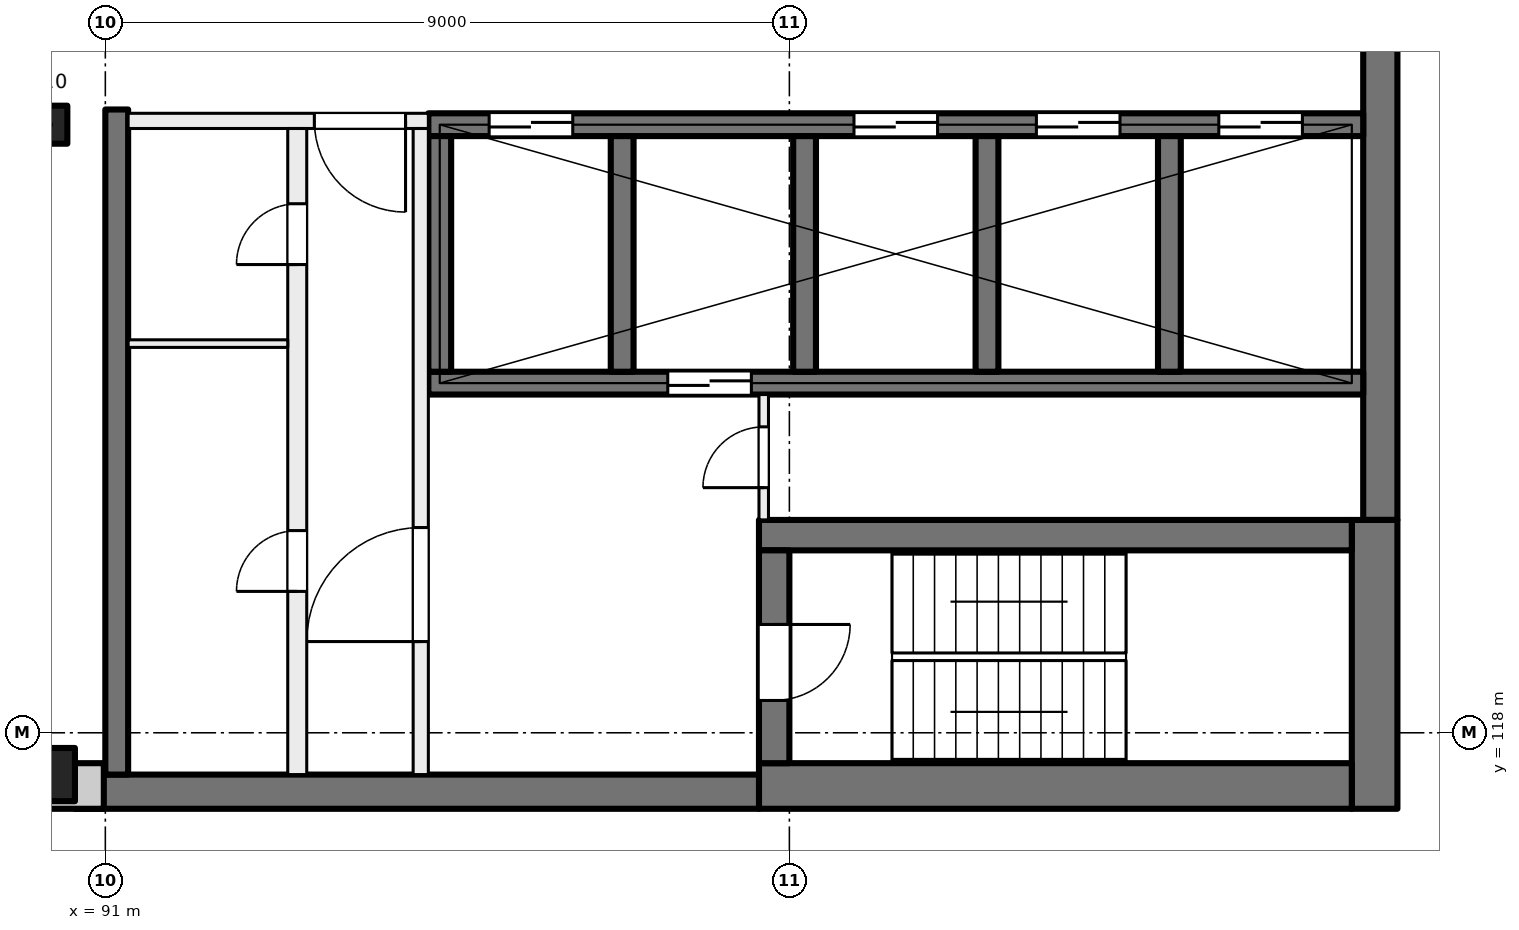
"""IFC4 building model, lengths in metres.
Left out: names, types, materials, properties, quantities, classifications, styles, units other than length and angle.
Written with IfcOpenShell. Run it as: python <this file> out.ifc"""

import sys

from ifc_helpers import new_model, si_unit, direction, frame, frame_2d, origin, origin_2d, place, context, subcontext, project, spatial, rectangle, extrude, element, fill, save


model = new_model("IFC4")
c1 = context("Model", 3, precision=1e-05, world=origin(), true_north=direction((0.0, 1.0)))
c2 = subcontext(c1, "Body", "Model", "MODEL_VIEW")
j1 = project(units=[si_unit("LENGTHUNIT", "METRE"), si_unit("PLANEANGLEUNIT", "RADIAN")], contexts=[c1])
p1 = place(None, origin())
s1 = spatial("IfcSite", under=j1, at=p1, CompositionType="ELEMENT")
p2 = place(p1, origin())
s2 = spatial("IfcBuilding", under=s1, at=p2, CompositionType="ELEMENT")
p3 = place(p2, frame((0.0, 0.0, 245.5)))
s3 = spatial("IfcBuildingStorey", under=s2, at=p3, CompositionType="ELEMENT", Elevation=245.5)
p4 = place(p3, frame((90.25, 126.0, 0.0), z_axis=(0.0, 0.0, 1.0), x_axis=(1.0, 0.0, 0.0)))
e1 = element("IfcColumn", 1, at=p4, inside=s3, PredefinedType="COLUMN", context=c2, shape_type="SweptSolid", body=[
    extrude(rectangle(XDim=0.5, YDim=0.5, at=origin_2d()), origin(), (0.0, 0.0, 1.0), 4.0),
])
p5 = place(p3, frame((90.25, 117.45, 0.0), z_axis=(0.0, 0.0, 1.0), x_axis=(1.0, 0.0, 0.0)))
e2 = element("IfcColumn", 2, at=p5, inside=s3, PredefinedType="COLUMN", context=c2, shape_type="SweptSolid", body=[
    extrude(rectangle(XDim=0.7, YDim=0.7, at=origin_2d()), origin(), (0.0, 0.0, 1.0), 4.0),
])
p6 = place(p3, frame((107.775, 135.2, 0.0), z_axis=(0.0, 0.0, 1.0), x_axis=(0.0, -1.0, 0.0)))
e3 = element("IfcWall", 3, at=p6, inside=s3, PredefinedType="SHEAR", context=c2, shape_type="SweptSolid", body=[
    extrude(rectangle(XDim=14.4, YDim=0.45, at=frame_2d((7.2, 0.0))), origin(), (0.0, 0.0, 1.0), 4.0),
])
p7 = place(p3, frame((107.7, 120.8, 0.0), z_axis=(0.0, 0.0, 1.0), x_axis=(0.0, -1.0, 0.0)))
e4 = element("IfcWall", 4, at=p7, inside=s3, PredefinedType="SHEAR", context=c2, shape_type="SweptSolid", body=[
    extrude(rectangle(XDim=3.8, YDim=0.6, at=frame_2d((1.9, 0.0))), origin(), (0.0, 0.0, 1.0), 4.0),
])
p8 = place(p3, frame((107.4, 117.3, 0.0), z_axis=(0.0, 0.0, 1.0), x_axis=(-1.0, 0.0, 0.0)))
e5 = element("IfcWall", 5, at=p8, inside=s3, PredefinedType="SHEAR", context=c2, shape_type="SweptSolid", body=[
    extrude(rectangle(XDim=7.8, YDim=0.6, at=frame_2d((3.9, 0.0))), origin(), (0.0, 0.0, 1.0), 4.0),
])
p9 = place(p3, frame((99.6, 117.225, 0.0), z_axis=(0.0, 0.0, 1.0), x_axis=(-1.0, 0.0, 0.0)))
e6 = element("IfcWall", 6, at=p9, inside=s3, PredefinedType="SHEAR", context=c2, shape_type="SweptSolid", body=[
    extrude(rectangle(XDim=9.0, YDim=0.45, at=frame_2d((4.5, 0.0))), origin(), (0.0, 0.0, 1.0), 4.0),
])
p10 = place(p3, frame((107.4, 120.6, 0.0), z_axis=(0.0, 0.0, 1.0), x_axis=(-1.0, 0.0, 0.0)))
e7 = element("IfcWall", 7, at=p10, inside=s3, PredefinedType="SHEAR", context=c2, shape_type="SweptSolid", body=[
    extrude(rectangle(XDim=7.8, YDim=0.4, at=frame_2d((3.9, 0.0))), origin(), (0.0, 0.0, 1.0), 4.0),
])
p11 = place(p3, frame((99.8, 120.4, 0.0), z_axis=(0.0, 0.0, 1.0), x_axis=(0.0, -1.0, 0.0)))
e8 = element("IfcWall", 8, at=p11, inside=s3, PredefinedType="SHEAR", context=c2, shape_type="SweptSolid", body=[
    extrude(rectangle(XDim=2.8, YDim=0.4, at=frame_2d((1.4, 0.0))), origin(), (0.0, 0.0, 1.0), 4.0),
])
p12 = place(p11, frame((0.975, 0.0, 0.0)))
e9 = element("IfcOpeningElement", 9, at=p12, cuts=e8, PredefinedType="OPENING", context=c2, shape_type="SweptSolid", body=[
    extrude(rectangle(XDim=1.0, YDim=2.1, at=frame_2d((0.5, 1.05))), frame((0.0, 0.21, 0.0), z_axis=(0.0, -1.0, 0.0), x_axis=(1.0, 0.0, 0.0)), (0.0, 0.0, 1.0), 0.42),
])
p13 = place(p3, frame((107.55, 126.0, 0.0), z_axis=(0.0, 0.0, 1.0), x_axis=(-1.0, 0.0, 0.0)))
e10 = element("IfcWall", 10, at=p13, inside=s3, PredefinedType="SHEAR", context=c2, shape_type="SweptSolid", body=[
    extrude(rectangle(XDim=12.3, YDim=0.3, at=frame_2d((6.15, 0.0))), origin(), (0.0, 0.0, 1.0), 4.0),
])
p14 = place(p13, frame((0.8, 0.0, 0.0)))
e11 = element("IfcOpeningElement", 11, at=p14, cuts=e10, PredefinedType="OPENING", context=c2, shape_type="SweptSolid", body=[
    extrude(rectangle(XDim=1.1, YDim=2.1, at=frame_2d((0.55, 1.05))), frame((0.0, 0.16, 0.0), z_axis=(0.0, -1.0, 0.0), x_axis=(1.0, 0.0, 0.0)), (0.0, 0.0, 1.0), 0.32),
])
p15 = place(p13, frame((3.2, 0.0, 0.0)))
e12 = element("IfcOpeningElement", 12, at=p15, cuts=e10, PredefinedType="OPENING", context=c2, shape_type="SweptSolid", body=[
    extrude(rectangle(XDim=1.1, YDim=2.1, at=frame_2d((0.55, 1.05))), frame((0.0, 0.16, 0.0), z_axis=(0.0, -1.0, 0.0), x_axis=(1.0, 0.0, 0.0)), (0.0, 0.0, 1.0), 0.32),
])
p16 = place(p13, frame((5.6, 0.0, 0.0)))
e13 = element("IfcOpeningElement", 13, at=p16, cuts=e10, PredefinedType="OPENING", context=c2, shape_type="SweptSolid", body=[
    extrude(rectangle(XDim=1.1, YDim=2.1, at=frame_2d((0.55, 1.05))), frame((0.0, 0.16, 0.0), z_axis=(0.0, -1.0, 0.0), x_axis=(1.0, 0.0, 0.0)), (0.0, 0.0, 1.0), 0.32),
])
p17 = place(p13, frame((10.4, 0.0, 0.0)))
e14 = element("IfcOpeningElement", 14, at=p17, cuts=e10, PredefinedType="OPENING", context=c2, shape_type="SweptSolid", body=[
    extrude(rectangle(XDim=1.1, YDim=2.1, at=frame_2d((0.55, 1.05))), frame((0.0, 0.16, 0.0), z_axis=(0.0, -1.0, 0.0), x_axis=(1.0, 0.0, 0.0)), (0.0, 0.0, 1.0), 0.32),
])
p18 = place(p3, frame((107.55, 122.6, 0.0), z_axis=(0.0, 0.0, 1.0), x_axis=(-1.0, 0.0, 0.0)))
e15 = element("IfcWall", 15, at=p18, inside=s3, PredefinedType="SHEAR", context=c2, shape_type="SweptSolid", body=[
    extrude(rectangle(XDim=12.3, YDim=0.3, at=frame_2d((6.15, 0.0))), origin(), (0.0, 0.0, 1.0), 4.0),
])
p19 = place(p18, frame((8.05, 0.0, 0.0)))
e16 = element("IfcOpeningElement", 16, at=p19, cuts=e15, PredefinedType="OPENING", context=c2, shape_type="SweptSolid", body=[
    extrude(rectangle(XDim=1.1, YDim=2.1, at=frame_2d((0.55, 1.05))), frame((0.0, 0.16, 0.0), z_axis=(0.0, -1.0, 0.0), x_axis=(1.0, 0.0, 0.0)), (0.0, 0.0, 1.0), 0.32),
])
for number, where, z_axis, x_axis in (
    (17, (105.0, 125.85, 0.0), (0.0, 0.0, 1.0), (0.0, -1.0, 0.0)),
    (18, (102.6, 125.85, 0.0), (0.0, 0.0, 1.0), (0.0, -1.0, 0.0)),
    (19, (100.2, 125.85, 0.0), (0.0, 0.0, 1.0), (0.0, -1.0, 0.0)),
    (20, (97.8, 125.85, 0.0), (0.0, 0.0, 1.0), (0.0, -1.0, 0.0)),
    (21, (95.4, 125.85, 0.0), (0.0, 0.0, 1.0), (0.0, -1.0, 0.0)),
):
    element("IfcWall", number, at=place(p3, frame(where, z_axis=z_axis, x_axis=x_axis)), inside=s3, PredefinedType="SHEAR", context=c2, shape_type="SweptSolid", body=[
        extrude(rectangle(XDim=3.1, YDim=0.3, at=frame_2d((1.55, 0.0))), origin(), (0.0, 0.0, 1.0), 4.0),
    ])
p20 = place(p3, frame((91.15, 126.2, 0.0), z_axis=(0.0, 0.0, 1.0), x_axis=(0.0, -1.0, 0.0)))
e22 = element("IfcWall", 22, at=p20, inside=s3, PredefinedType="SHEAR", context=c2, shape_type="SweptSolid", body=[
    extrude(rectangle(XDim=8.75, YDim=0.3, at=frame_2d((4.375, 0.0))), origin(), (0.0, 0.0, 1.0), 4.0),
])
p21 = place(p3, frame((90.98, 117.3, 0.0), z_axis=(0.0, 0.0, 1.0), x_axis=(-1.0, 0.0, 0.0)))
e23 = element("IfcWall", 23, at=p21, inside=s3, PredefinedType="SOLIDWALL", context=c2, shape_type="SweptSolid", body=[
    extrude(rectangle(XDim=43.98, YDim=0.6, at=frame_2d((21.99, 0.0))), origin(), (0.0, 0.0, 1.0), 3.625),
])
p22 = place(p21, frame((1.48, 0.0, 0.9)))
e24 = element("IfcOpeningElement", 24, at=p22, cuts=e23, PredefinedType="OPENING", context=c2, shape_type="SweptSolid", body=[
    extrude(rectangle(XDim=3.0, YDim=2.4, at=frame_2d((1.5, 1.2))), frame((0.0, 0.31, 0.0), z_axis=(0.0, -1.0, 0.0), x_axis=(1.0, 0.0, 0.0)), (0.0, 0.0, 1.0), 0.62),
])
p23 = place(p21, frame((5.98, 0.0, 0.9)))
e25 = element("IfcOpeningElement", 25, at=p23, cuts=e23, PredefinedType="OPENING", context=c2, shape_type="SweptSolid", body=[
    extrude(rectangle(XDim=3.0, YDim=2.4, at=frame_2d((1.5, 1.2))), frame((0.0, 0.31, 0.0), z_axis=(0.0, -1.0, 0.0), x_axis=(1.0, 0.0, 0.0)), (0.0, 0.0, 1.0), 0.62),
])
p24 = place(p21, frame((10.48, 0.0, 0.9)))
e26 = element("IfcOpeningElement", 26, at=p24, cuts=e23, PredefinedType="OPENING", context=c2, shape_type="SweptSolid", body=[
    extrude(rectangle(XDim=3.0, YDim=2.4, at=frame_2d((1.5, 1.2))), frame((0.0, 0.31, 0.0), z_axis=(0.0, -1.0, 0.0), x_axis=(1.0, 0.0, 0.0)), (0.0, 0.0, 1.0), 0.62),
])
p25 = place(p21, frame((14.98, 0.0, 0.9)))
e27 = element("IfcOpeningElement", 27, at=p25, cuts=e23, PredefinedType="OPENING", context=c2, shape_type="SweptSolid", body=[
    extrude(rectangle(XDim=3.0, YDim=2.4, at=frame_2d((1.5, 1.2))), frame((0.0, 0.31, 0.0), z_axis=(0.0, -1.0, 0.0), x_axis=(1.0, 0.0, 0.0)), (0.0, 0.0, 1.0), 0.62),
])
p26 = place(p21, frame((19.48, 0.0, 0.9)))
e28 = element("IfcOpeningElement", 28, at=p26, cuts=e23, PredefinedType="OPENING", context=c2, shape_type="SweptSolid", body=[
    extrude(rectangle(XDim=3.0, YDim=2.4, at=frame_2d((1.5, 1.2))), frame((0.0, 0.31, 0.0), z_axis=(0.0, -1.0, 0.0), x_axis=(1.0, 0.0, 0.0)), (0.0, 0.0, 1.0), 0.62),
])
p27 = place(p21, frame((23.98, 0.0, 0.9)))
e29 = element("IfcOpeningElement", 29, at=p27, cuts=e23, PredefinedType="OPENING", context=c2, shape_type="SweptSolid", body=[
    extrude(rectangle(XDim=3.0, YDim=2.4, at=frame_2d((1.5, 1.2))), frame((0.0, 0.31, 0.0), z_axis=(0.0, -1.0, 0.0), x_axis=(1.0, 0.0, 0.0)), (0.0, 0.0, 1.0), 0.62),
])
p28 = place(p21, frame((28.48, 0.0, 0.9)))
e30 = element("IfcOpeningElement", 30, at=p28, cuts=e23, PredefinedType="OPENING", context=c2, shape_type="SweptSolid", body=[
    extrude(rectangle(XDim=3.0, YDim=2.4, at=frame_2d((1.5, 1.2))), frame((0.0, 0.31, 0.0), z_axis=(0.0, -1.0, 0.0), x_axis=(1.0, 0.0, 0.0)), (0.0, 0.0, 1.0), 0.62),
])
p29 = place(p21, frame((32.98, 0.0, 0.9)))
e31 = element("IfcOpeningElement", 31, at=p29, cuts=e23, PredefinedType="OPENING", context=c2, shape_type="SweptSolid", body=[
    extrude(rectangle(XDim=3.0, YDim=2.4, at=frame_2d((1.5, 1.2))), frame((0.0, 0.31, 0.0), z_axis=(0.0, -1.0, 0.0), x_axis=(1.0, 0.0, 0.0)), (0.0, 0.0, 1.0), 0.62),
])
p30 = place(p21, frame((37.48, 0.0, 0.9)))
e32 = element("IfcOpeningElement", 32, at=p30, cuts=e23, PredefinedType="OPENING", context=c2, shape_type="SweptSolid", body=[
    extrude(rectangle(XDim=3.0, YDim=2.4, at=frame_2d((1.5, 1.2))), frame((0.0, 0.31, 0.0), z_axis=(0.0, -1.0, 0.0), x_axis=(1.0, 0.0, 0.0)), (0.0, 0.0, 1.0), 0.62),
])
p31 = place(p3, frame((95.25, 126.05, 0.0), z_axis=(0.0, 0.0, 1.0), x_axis=(-1.0, 0.0, 0.0)))
e33 = element("IfcWall", 33, at=p31, inside=s3, PredefinedType="PARTITIONING", context=c2, shape_type="SweptSolid", body=[
    extrude(rectangle(XDim=3.95, YDim=0.2, at=frame_2d((1.975, 0.0))), origin(), (0.0, 0.0, 1.0), 3.625),
])
p32 = place(p31, frame((0.3, 0.0, 0.0)))
e34 = element("IfcOpeningElement", 34, at=p32, cuts=e33, PredefinedType="OPENING", context=c2, shape_type="SweptSolid", body=[
    extrude(rectangle(XDim=1.2, YDim=2.1, at=frame_2d((0.6, 1.05))), frame((0.0, 0.11, 0.0), z_axis=(0.0, -1.0, 0.0), x_axis=(1.0, 0.0, 0.0)), (0.0, 0.0, 1.0), 0.22),
])
p33 = place(p3, frame((95.15, 117.45, 0.0), z_axis=(0.0, 0.0, 1.0), x_axis=(0.0, 1.0, 0.0)))
e35 = element("IfcWall", 35, at=p33, inside=s3, PredefinedType="PARTITIONING", context=c2, shape_type="SweptSolid", body=[
    extrude(rectangle(XDim=8.5, YDim=0.2, at=frame_2d((4.25, 0.0))), origin(), (0.0, 0.0, 1.0), 3.625),
])
p34 = place(p33, frame((1.75, 0.0, 0.0)))
e36 = element("IfcOpeningElement", 36, at=p34, cuts=e35, PredefinedType="OPENING", context=c2, shape_type="SweptSolid", body=[
    extrude(rectangle(XDim=1.5, YDim=2.1, at=frame_2d((0.75, 1.05))), frame((0.0, 0.11, 0.0), z_axis=(0.0, -1.0, 0.0), x_axis=(1.0, 0.0, 0.0)), (0.0, 0.0, 1.0), 0.22),
])
p35 = place(p3, frame((93.525, 117.45, 0.0), z_axis=(0.0, 0.0, 1.0), x_axis=(0.0, 1.0, 0.0)))
e37 = element("IfcWall", 37, at=p35, inside=s3, PredefinedType="PARTITIONING", context=c2, shape_type="SweptSolid", body=[
    extrude(rectangle(XDim=8.5, YDim=0.25, at=frame_2d((4.25, 0.0))), origin(), (0.0, 0.0, 1.0), 3.625),
])
p36 = place(p35, frame((6.71, 0.0, 0.0)))
e38 = element("IfcOpeningElement", 38, at=p36, cuts=e37, PredefinedType="OPENING", context=c2, shape_type="SweptSolid", body=[
    extrude(rectangle(XDim=0.8, YDim=2.1, at=frame_2d((0.4, 1.05))), frame((0.0, 0.135, 0.0), z_axis=(0.0, -1.0, 0.0), x_axis=(1.0, 0.0, 0.0)), (0.0, 0.0, 1.0), 0.27),
])
p37 = place(p35, frame((2.41, 0.0, 0.0)))
e39 = element("IfcOpeningElement", 39, at=p37, cuts=e37, PredefinedType="OPENING", context=c2, shape_type="SweptSolid", body=[
    extrude(rectangle(XDim=0.8, YDim=2.1, at=frame_2d((0.4, 1.05))), frame((0.0, 0.135, 0.0), z_axis=(0.0, -1.0, 0.0), x_axis=(1.0, 0.0, 0.0)), (0.0, 0.0, 1.0), 0.27),
])
p38 = place(p3, frame((99.663, 120.8, 0.0), z_axis=(0.0, 0.0, 1.0), x_axis=(0.0, 1.0, 0.0)))
e40 = element("IfcWall", 40, at=p38, inside=s3, PredefinedType="PARTITIONING", context=c2, shape_type="SweptSolid", body=[
    extrude(rectangle(XDim=1.65, YDim=0.125, at=frame_2d((0.825, 0.0))), origin(), (0.0, 0.0, 1.0), 3.625),
])
p39 = place(p38, frame((0.425, 0.0, 0.0)))
e41 = element("IfcOpeningElement", 41, at=p39, cuts=e40, PredefinedType="OPENING", context=c2, shape_type="SweptSolid", body=[
    extrude(rectangle(XDim=0.8, YDim=2.1, at=frame_2d((0.4, 1.05))), frame((0.0, 0.073, 0.0), z_axis=(0.0, -1.0, 0.0), x_axis=(1.0, 0.0, 0.0)), (0.0, 0.0, 1.0), 0.145),
])
p40 = place(p3, frame((93.4, 123.12, 0.0), z_axis=(0.0, 0.0, 1.0), x_axis=(-1.0, 0.0, 0.0)))
e42 = element("IfcWall", 42, at=p40, inside=s3, PredefinedType="PARTITIONING", context=c2, shape_type="SweptSolid", body=[
    extrude(rectangle(XDim=2.1, YDim=0.1, at=frame_2d((1.05, 0.0))), origin(), (0.0, 0.0, 1.0), 3.625),
])
p41 = place(p14, origin())
e43 = element("IfcDoor", 43, at=p41, inside=s3, OperationType="DOUBLE_DOOR_SLIDING", PredefinedType="DOOR", context=c2, shape_type="SweptSolid", body=[
    extrude(rectangle(XDim=1.1, YDim=2.1, at=frame_2d((0.55, 1.05))), frame((0.0, 0.025, 0.0), z_axis=(0.0, -1.0, 0.0), x_axis=(1.0, 0.0, 0.0)), (0.0, 0.0, 1.0), 0.05),
])
fill(e11, e43)
p42 = place(p15, origin())
e44 = element("IfcDoor", 44, at=p42, inside=s3, OperationType="DOUBLE_DOOR_SLIDING", PredefinedType="DOOR", context=c2, shape_type="SweptSolid", body=[
    extrude(rectangle(XDim=1.1, YDim=2.1, at=frame_2d((0.55, 1.05))), frame((0.0, 0.025, 0.0), z_axis=(0.0, -1.0, 0.0), x_axis=(1.0, 0.0, 0.0)), (0.0, 0.0, 1.0), 0.05),
])
fill(e12, e44)
p43 = place(p16, origin())
e45 = element("IfcDoor", 45, at=p43, inside=s3, OperationType="DOUBLE_DOOR_SLIDING", PredefinedType="DOOR", context=c2, shape_type="SweptSolid", body=[
    extrude(rectangle(XDim=1.1, YDim=2.1, at=frame_2d((0.55, 1.05))), frame((0.0, 0.025, 0.0), z_axis=(0.0, -1.0, 0.0), x_axis=(1.0, 0.0, 0.0)), (0.0, 0.0, 1.0), 0.05),
])
fill(e13, e45)
p44 = place(p17, origin())
e46 = element("IfcDoor", 46, at=p44, inside=s3, OperationType="DOUBLE_DOOR_SLIDING", PredefinedType="DOOR", context=c2, shape_type="SweptSolid", body=[
    extrude(rectangle(XDim=1.1, YDim=2.1, at=frame_2d((0.55, 1.05))), frame((0.0, 0.025, 0.0), z_axis=(0.0, -1.0, 0.0), x_axis=(1.0, 0.0, 0.0)), (0.0, 0.0, 1.0), 0.05),
])
fill(e14, e46)
p45 = place(p32, origin())
e47 = element("IfcDoor", 47, at=p45, inside=s3, OperationType="DOUBLE_DOOR_SINGLE_SWING", PredefinedType="DOOR", context=c2, shape_type="SweptSolid", body=[
    extrude(rectangle(XDim=1.2, YDim=2.1, at=frame_2d((0.6, 1.05))), frame((0.0, 0.025, 0.0), z_axis=(0.0, -1.0, 0.0), x_axis=(1.0, 0.0, 0.0)), (0.0, 0.0, 1.0), 0.05),
])
fill(e34, e47)
p46 = place(p34, origin())
e48 = element("IfcDoor", 48, at=p46, inside=s3, OperationType="DOUBLE_DOOR_SINGLE_SWING", PredefinedType="DOOR", context=c2, shape_type="SweptSolid", body=[
    extrude(rectangle(XDim=1.5, YDim=2.1, at=frame_2d((0.75, 1.05))), frame((0.0, 0.025, 0.0), z_axis=(0.0, -1.0, 0.0), x_axis=(1.0, 0.0, 0.0)), (0.0, 0.0, 1.0), 0.05),
])
fill(e36, e48)
p47 = place(p12, origin())
e49 = element("IfcDoor", 49, at=p47, inside=s3, OperationType="SINGLE_SWING_LEFT", PredefinedType="DOOR", context=c2, shape_type="SweptSolid", body=[
    extrude(rectangle(XDim=1.0, YDim=2.1, at=frame_2d((0.5, 1.05))), frame((0.0, 0.025, 0.0), z_axis=(0.0, -1.0, 0.0), x_axis=(1.0, 0.0, 0.0)), (0.0, 0.0, 1.0), 0.05),
])
fill(e9, e49)
p48 = place(p39, origin())
e50 = element("IfcDoor", 50, at=p48, inside=s3, OperationType="SINGLE_SWING_RIGHT", PredefinedType="DOOR", context=c2, shape_type="SweptSolid", body=[
    extrude(rectangle(XDim=0.8, YDim=2.1, at=frame_2d((0.4, 1.05))), frame((0.0, 0.025, 0.0), z_axis=(0.0, -1.0, 0.0), x_axis=(1.0, 0.0, 0.0)), (0.0, 0.0, 1.0), 0.05),
])
fill(e41, e50)
p49 = place(p36, origin())
e51 = element("IfcDoor", 51, at=p49, inside=s3, OperationType="SINGLE_SWING_LEFT", PredefinedType="DOOR", context=c2, shape_type="SweptSolid", body=[
    extrude(rectangle(XDim=0.8, YDim=2.1, at=frame_2d((0.4, 1.05))), frame((0.0, 0.025, 0.0), z_axis=(0.0, -1.0, 0.0), x_axis=(1.0, 0.0, 0.0)), (0.0, 0.0, 1.0), 0.05),
])
fill(e38, e51)
p50 = place(p37, origin())
e52 = element("IfcDoor", 52, at=p50, inside=s3, OperationType="SINGLE_SWING_RIGHT", PredefinedType="DOOR", context=c2, shape_type="SweptSolid", body=[
    extrude(rectangle(XDim=0.8, YDim=2.1, at=frame_2d((0.4, 1.05))), frame((0.0, 0.025, 0.0), z_axis=(0.0, -1.0, 0.0), x_axis=(1.0, 0.0, 0.0)), (0.0, 0.0, 1.0), 0.05),
])
fill(e39, e52)
p51 = place(p19, origin())
e53 = element("IfcDoor", 53, at=p51, inside=s3, OperationType="DOUBLE_DOOR_SLIDING", PredefinedType="DOOR", context=c2, shape_type="SweptSolid", body=[
    extrude(rectangle(XDim=1.1, YDim=2.1, at=frame_2d((0.55, 1.05))), frame((0.0, 0.025, 0.0), z_axis=(0.0, -1.0, 0.0), x_axis=(1.0, 0.0, 0.0)), (0.0, 0.0, 1.0), 0.05),
])
fill(e16, e53)
save(model, sys.argv[1])
